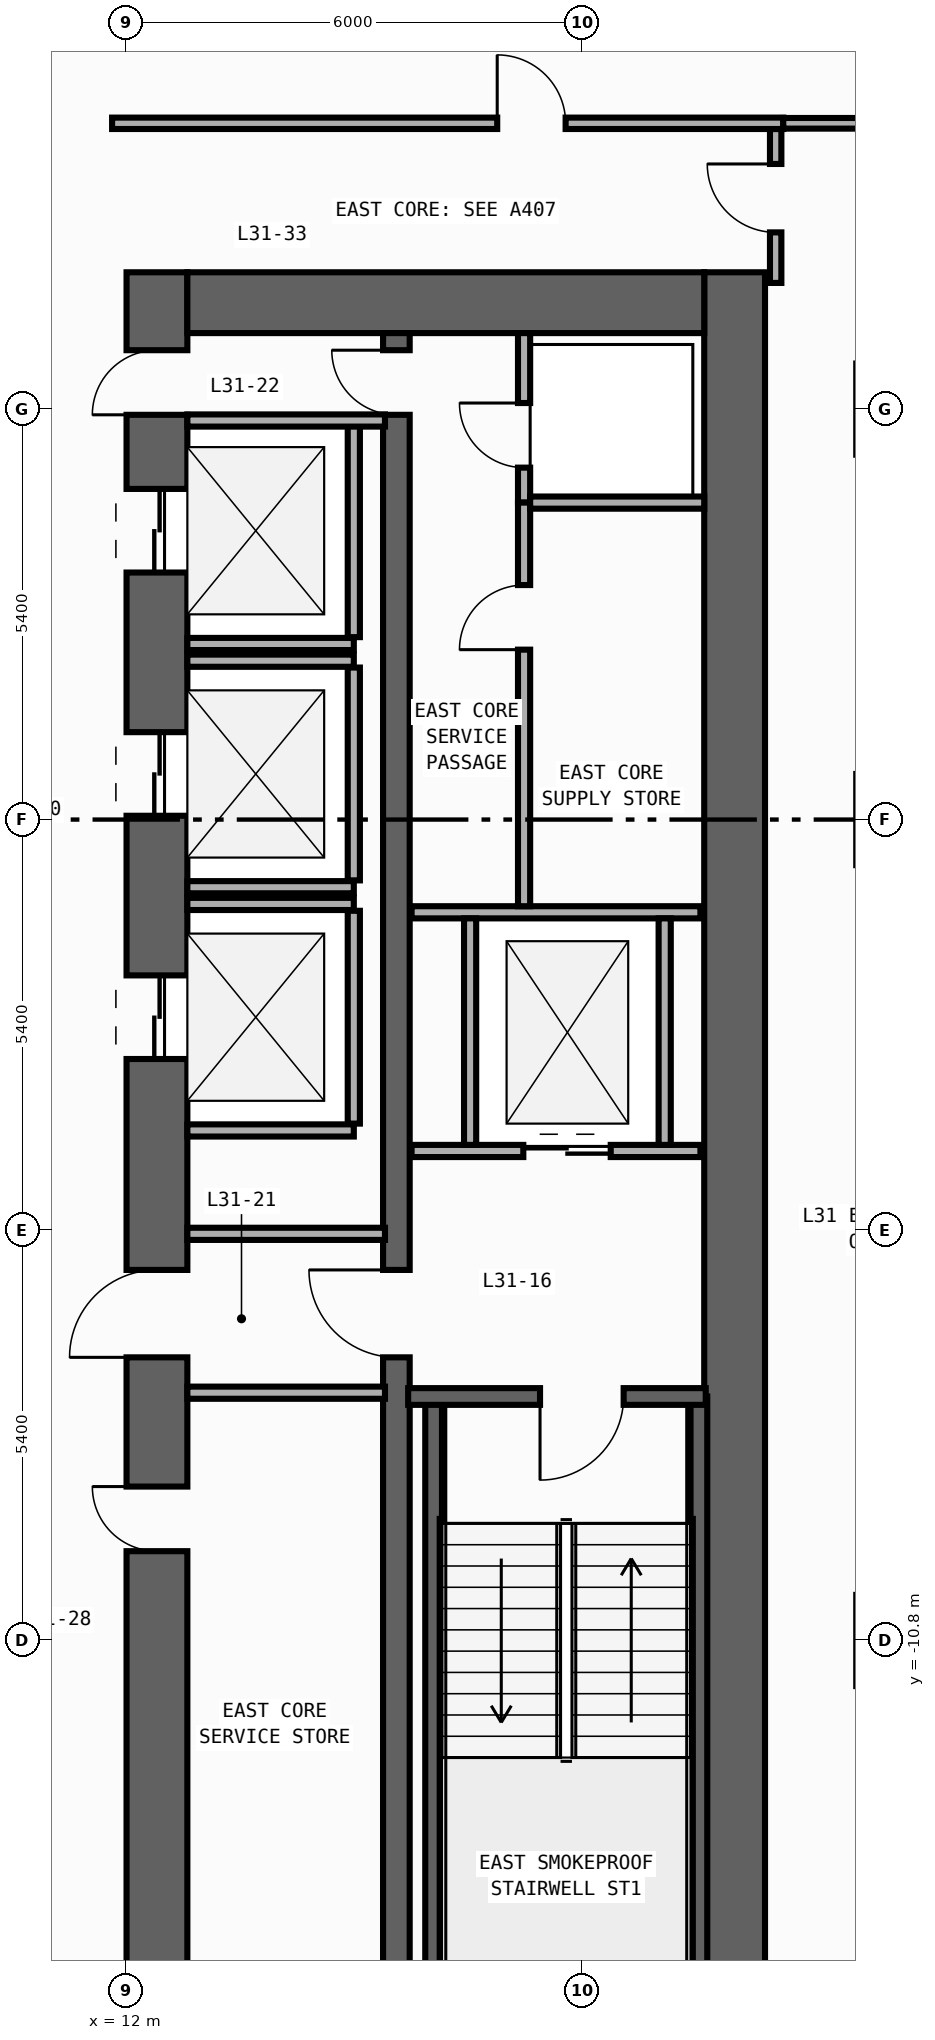
"""IFC4 building model, lengths in metres.
Left out: names, types, materials, properties, quantities, classifications, styles, units other than length and angle.
Written with IfcOpenShell. Run it as: python <this file> out.ifc"""

import sys

from ifc_helpers import new_model, si_unit, direction, frame, frame_2d, origin, origin_2d, place, context, subcontext, project, spatial, rectangle, extrude, element, fill, save


model = new_model("IFC4")
c1 = context("Model", 3, precision=1e-05, world=origin(), true_north=direction((0.0, 1.0)))
c2 = subcontext(c1, "Body", "Model", "MODEL_VIEW")
j1 = project(units=[si_unit("LENGTHUNIT", "METRE"), si_unit("PLANEANGLEUNIT", "RADIAN")], contexts=[c1])
p1 = place(None, origin())
s1 = spatial("IfcSite", under=j1, at=p1, CompositionType="ELEMENT")
p2 = place(p1, origin())
s2 = spatial("IfcBuilding", under=s1, at=p2, CompositionType="ELEMENT")
p3 = place(p2, frame((0.0, 0.0, 135.2)))
s3 = spatial("IfcBuildingStorey", under=s2, at=p3, CompositionType="ELEMENT", Elevation=135.2)
p4 = place(p3, frame((12.4, -19.8, 0.0), z_axis=(0.0, 0.0, 1.0), x_axis=(0.0, 1.0, 0.0)))
e1 = element("IfcWall", 1, at=p4, inside=s3, PredefinedType="SHEAR", context=c2, shape_type="SweptSolid", body=[
    extrude(rectangle(XDim=27.0, YDim=0.8, at=frame_2d((13.5, 0.0))), origin(), (0.0, 0.0, 1.0), 3.94),
])
p5 = place(p4, frame((23.05, 0.0, 0.0)))
e2 = element("IfcOpeningElement", 2, at=p5, cuts=e1, PredefinedType="OPENING", context=c2, shape_type="SweptSolid", body=[
    extrude(rectangle(XDim=1.1, YDim=2.2, at=frame_2d((0.55, 1.1))), frame((0.0, 0.41, 0.0), z_axis=(0.0, -1.0, 0.0), x_axis=(1.0, 0.0, 0.0)), (0.0, 0.0, 1.0), 0.82),
])
p6 = place(p4, frame((19.85, 0.0, 0.0)))
e3 = element("IfcOpeningElement", 3, at=p6, cuts=e1, PredefinedType="OPENING", context=c2, shape_type="SweptSolid", body=[
    extrude(rectangle(XDim=1.1, YDim=2.2, at=frame_2d((0.55, 1.1))), frame((0.0, 0.41, 0.0), z_axis=(0.0, -1.0, 0.0), x_axis=(1.0, 0.0, 0.0)), (0.0, 0.0, 1.0), 0.82),
])
p7 = place(p4, frame((16.65, 0.0, 0.0)))
e4 = element("IfcOpeningElement", 4, at=p7, cuts=e1, PredefinedType="OPENING", context=c2, shape_type="SweptSolid", body=[
    extrude(rectangle(XDim=1.1, YDim=2.2, at=frame_2d((0.55, 1.1))), frame((0.0, 0.41, 0.0), z_axis=(0.0, -1.0, 0.0), x_axis=(1.0, 0.0, 0.0)), (0.0, 0.0, 1.0), 0.82),
])
p8 = place(p4, frame((10.175, 0.0, 0.0)))
e5 = element("IfcOpeningElement", 5, at=p8, cuts=e1, PredefinedType="OPENING", context=c2, shape_type="SweptSolid", body=[
    extrude(rectangle(XDim=0.85, YDim=2.1, at=frame_2d((0.425, 1.05))), frame((0.0, 0.41, 0.0), z_axis=(0.0, -1.0, 0.0), x_axis=(1.0, 0.0, 0.0)), (0.0, 0.0, 1.0), 0.82),
])
p9 = place(p4, frame((12.725, 0.0, 0.0)))
e6 = element("IfcOpeningElement", 6, at=p9, cuts=e1, PredefinedType="OPENING", context=c2, shape_type="SweptSolid", body=[
    extrude(rectangle(XDim=1.15, YDim=2.2, at=frame_2d((0.575, 1.1))), frame((0.0, 0.41, 0.0), z_axis=(0.0, -1.0, 0.0), x_axis=(1.0, 0.0, 0.0)), (0.0, 0.0, 1.0), 0.82),
])
p10 = place(p4, frame((25.125, 0.0, 0.0)))
e7 = element("IfcOpeningElement", 7, at=p10, cuts=e1, PredefinedType="OPENING", context=c2, shape_type="SweptSolid", body=[
    extrude(rectangle(XDim=0.85, YDim=2.1, at=frame_2d((0.425, 1.05))), frame((0.0, 0.41, 0.0), z_axis=(0.0, -1.0, 0.0), x_axis=(1.0, 0.0, 0.0)), (0.0, 0.0, 1.0), 0.82),
])
p11 = place(p3, frame((20.0, -19.8, 0.0), z_axis=(0.0, 0.0, 1.0), x_axis=(0.0, 1.0, 0.0)))
e8 = element("IfcWall", 8, at=p11, inside=s3, PredefinedType="SHEAR", context=c2, shape_type="SweptSolid", body=[
    extrude(rectangle(XDim=27.0, YDim=0.8, at=frame_2d((13.5, 0.0))), origin(), (0.0, 0.0, 1.0), 3.94),
])
p12 = place(p3, frame((12.8, 6.8, 0.0), z_axis=(0.0, 0.0, 1.0), x_axis=(1.0, 0.0, 0.0)))
e9 = element("IfcWall", 9, at=p12, inside=s3, PredefinedType="SHEAR", context=c2, shape_type="SweptSolid", body=[
    extrude(rectangle(XDim=6.8, YDim=0.8, at=frame_2d((3.4, 0.0))), origin(), (0.0, 0.0, 1.0), 3.94),
])
p13 = place(p3, frame((15.55, -19.0, 0.0), z_axis=(0.0, 0.0, 1.0), x_axis=(0.0, 1.0, 0.0)))
e10 = element("IfcWall", 10, at=p13, inside=s3, PredefinedType="SHEAR", context=c2, shape_type="SweptSolid", body=[
    extrude(rectangle(XDim=25.4, YDim=0.35, at=frame_2d((12.7, 0.0))), origin(), (0.0, 0.0, 1.0), 3.94),
])
p14 = place(p13, frame((11.925, 0.0, 0.0)))
e11 = element("IfcOpeningElement", 11, at=p14, cuts=e10, PredefinedType="OPENING", context=c2, shape_type="SweptSolid", body=[
    extrude(rectangle(XDim=1.15, YDim=2.2, at=frame_2d((0.575, 1.1))), frame((0.0, 0.185, 0.0), z_axis=(0.0, -1.0, 0.0), x_axis=(1.0, 0.0, 0.0)), (0.0, 0.0, 1.0), 0.37),
])
p15 = place(p13, frame((24.325, 0.0, 0.0)))
e12 = element("IfcOpeningElement", 12, at=p15, cuts=e10, PredefinedType="OPENING", context=c2, shape_type="SweptSolid", body=[
    extrude(rectangle(XDim=0.85, YDim=2.1, at=frame_2d((0.425, 1.05))), frame((0.0, 0.185, 0.0), z_axis=(0.0, -1.0, 0.0), x_axis=(1.0, 0.0, 0.0)), (0.0, 0.0, 1.0), 0.37),
])
for number, where, z_axis, x_axis in (
    (13, (16.04, -18.89, 0.0), (0.0, 0.0, 1.0), (0.0, 1.0, 0.0)),
    (14, (19.53, -18.89, 0.0), (0.0, 0.0, 1.0), (0.0, 1.0, 0.0)),
):
    element("IfcWall", number, at=place(p3, frame(where, z_axis=z_axis, x_axis=x_axis)), inside=s3, PredefinedType="SHEAR", context=c2, shape_type="SweptSolid", body=[
        extrude(rectangle(XDim=11.3, YDim=0.22, at=frame_2d((5.65, 0.0))), origin(), (0.0, 0.0, 1.0), 3.94),
    ])
p16 = place(p3, frame((19.62, -7.59, 0.0), z_axis=(0.0, 0.0, 1.0), x_axis=(-1.0, 0.0, 0.0)))
e15 = element("IfcWall", 15, at=p16, inside=s3, PredefinedType="SHEAR", context=c2, shape_type="SweptSolid", body=[
    extrude(rectangle(XDim=3.915, YDim=0.22, at=frame_2d((1.958, 0.0))), origin(), (0.0, 0.0, 1.0), 3.94),
])
p17 = place(p16, frame((1.08, 0.0, 0.0)))
e16 = element("IfcOpeningElement", 16, at=p17, cuts=e15, PredefinedType="OPENING", context=c2, shape_type="SweptSolid", body=[
    extrude(rectangle(XDim=1.1, YDim=2.2, at=frame_2d((0.55, 1.1))), frame((0.0, 0.12, 0.0), z_axis=(0.0, -1.0, 0.0), x_axis=(1.0, 0.0, 0.0)), (0.0, 0.0, 1.0), 0.24),
])
for number, where, z_axis, x_axis in (
    (17, (22.2, -10.8, 0.0), (0.0, 0.0, 1.0), (1.0, 0.0, 0.0)),
    (18, (22.2, 0.0, 0.0), (0.0, 0.0, 1.0), (1.0, 0.0, 0.0)),
    (19, (22.2, 5.4, 0.0), (0.0, 0.0, 1.0), (1.0, 0.0, 0.0)),
):
    element("IfcColumn", number, at=place(p3, frame(where, z_axis=z_axis, x_axis=x_axis)), inside=s3, PredefinedType="COLUMN", context=c2, shape_type="SweptSolid", body=[
        extrude(rectangle(XDim=1.2, YDim=1.2, at=origin_2d()), origin(), (0.0, 0.0, 1.0), 4.2),
    ])
p18 = place(p3, frame((12.8, 2.31, 0.0), z_axis=(0.0, 0.0, 1.0), x_axis=(1.0, 0.0, 0.0)))
e20 = element("IfcWall", 20, at=p18, inside=s3, PredefinedType="STANDARD", context=c2, shape_type="SweptSolid", body=[
    extrude(rectangle(XDim=2.19, YDim=0.16, at=frame_2d((1.095, 0.0))), origin(), (0.0, 0.0, 1.0), 3.94),
])
p19 = place(p3, frame((14.99, 2.4, 0.0), z_axis=(0.0, 0.0, 1.0), x_axis=(0.0, 1.0, 0.0)))
e21 = element("IfcWall", 21, at=p19, inside=s3, PredefinedType="STANDARD", context=c2, shape_type="SweptSolid", body=[
    extrude(rectangle(XDim=2.8, YDim=0.16, at=frame_2d((1.4, 0.0))), origin(), (0.0, 0.0, 1.0), 3.94),
])
for number, where, z_axis, x_axis in (
    (22, (12.8, -0.89, 0.0), (0.0, 0.0, 1.0), (1.0, 0.0, 0.0)),
    (23, (12.8, 2.09, 0.0), (0.0, 0.0, 1.0), (1.0, 0.0, 0.0)),
):
    element("IfcWall", number, at=place(p3, frame(where, z_axis=z_axis, x_axis=x_axis)), inside=s3, PredefinedType="STANDARD", context=c2, shape_type="SweptSolid", body=[
        extrude(rectangle(XDim=2.19, YDim=0.16, at=frame_2d((1.095, 0.0))), origin(), (0.0, 0.0, 1.0), 3.94),
    ])
p20 = place(p3, frame((14.99, -0.8, 0.0), z_axis=(0.0, 0.0, 1.0), x_axis=(0.0, 1.0, 0.0)))
e24 = element("IfcWall", 24, at=p20, inside=s3, PredefinedType="STANDARD", context=c2, shape_type="SweptSolid", body=[
    extrude(rectangle(XDim=2.8, YDim=0.16, at=frame_2d((1.4, 0.0))), origin(), (0.0, 0.0, 1.0), 3.94),
])
for number, where, z_axis, x_axis in (
    (25, (12.8, -4.09, 0.0), (0.0, 0.0, 1.0), (1.0, 0.0, 0.0)),
    (26, (12.8, -1.11, 0.0), (0.0, 0.0, 1.0), (1.0, 0.0, 0.0)),
):
    element("IfcWall", number, at=place(p3, frame(where, z_axis=z_axis, x_axis=x_axis)), inside=s3, PredefinedType="STANDARD", context=c2, shape_type="SweptSolid", body=[
        extrude(rectangle(XDim=2.19, YDim=0.16, at=frame_2d((1.095, 0.0))), origin(), (0.0, 0.0, 1.0), 3.94),
    ])
p21 = place(p3, frame((14.99, -4.0, 0.0), z_axis=(0.0, 0.0, 1.0), x_axis=(0.0, 1.0, 0.0)))
e27 = element("IfcWall", 27, at=p21, inside=s3, PredefinedType="STANDARD", context=c2, shape_type="SweptSolid", body=[
    extrude(rectangle(XDim=2.8, YDim=0.16, at=frame_2d((1.4, 0.0))), origin(), (0.0, 0.0, 1.0), 3.94),
])
p22 = place(p3, frame((15.75, -4.36, 0.0), z_axis=(0.0, 0.0, 1.0), x_axis=(1.0, 0.0, 0.0)))
e28 = element("IfcWall", 28, at=p22, inside=s3, PredefinedType="STANDARD", context=c2, shape_type="SweptSolid", body=[
    extrude(rectangle(XDim=3.8, YDim=0.16, at=frame_2d((1.9, 0.0))), origin(), (0.0, 0.0, 1.0), 3.94),
])
p23 = place(p22, frame((1.47, 0.0, 0.0)))
e29 = element("IfcOpeningElement", 29, at=p23, cuts=e28, PredefinedType="OPENING", context=c2, shape_type="SweptSolid", body=[
    extrude(rectangle(XDim=1.15, YDim=2.2, at=frame_2d((0.575, 1.1))), frame((0.0, 0.09, 0.0), z_axis=(0.0, -1.0, 0.0), x_axis=(1.0, 0.0, 0.0)), (0.0, 0.0, 1.0), 0.18),
])
p24 = place(p3, frame((15.75, -1.22, 0.0), z_axis=(0.0, 0.0, 1.0), x_axis=(1.0, 0.0, 0.0)))
e30 = element("IfcWall", 30, at=p24, inside=s3, PredefinedType="STANDARD", context=c2, shape_type="SweptSolid", body=[
    extrude(rectangle(XDim=3.8, YDim=0.16, at=frame_2d((1.9, 0.0))), origin(), (0.0, 0.0, 1.0), 3.94),
])
for number, where, z_axis, x_axis in (
    (31, (16.52, -4.28, 0.0), (0.0, 0.0, 1.0), (0.0, 1.0, 0.0)),
    (32, (19.08, -4.28, 0.0), (0.0, 0.0, 1.0), (0.0, 1.0, 0.0)),
):
    element("IfcWall", number, at=place(p3, frame(where, z_axis=z_axis, x_axis=x_axis)), inside=s3, PredefinedType="STANDARD", context=c2, shape_type="SweptSolid", body=[
        extrude(rectangle(XDim=2.98, YDim=0.16, at=frame_2d((1.49, 0.0))), origin(), (0.0, 0.0, 1.0), 3.94),
    ])
for number, where, z_axis, x_axis in (
    (33, (12.8, -5.45, 0.0), (0.0, 0.0, 1.0), (1.0, 0.0, 0.0)),
    (34, (12.8, -7.54, 0.0), (0.0, 0.0, 1.0), (1.0, 0.0, 0.0)),
    (35, (12.8, 5.25, 0.0), (0.0, 0.0, 1.0), (1.0, 0.0, 0.0)),
):
    element("IfcWall", number, at=place(p3, frame(where, z_axis=z_axis, x_axis=x_axis)), inside=s3, PredefinedType="STANDARD", context=c2, shape_type="SweptSolid", body=[
        extrude(rectangle(XDim=2.6, YDim=0.16, at=frame_2d((1.3, 0.0))), origin(), (0.0, 0.0, 1.0), 3.94),
    ])
p25 = place(p3, frame((17.23, 4.17, 0.0), z_axis=(0.0, 0.0, 1.0), x_axis=(0.0, 1.0, 0.0)))
e36 = element("IfcWall", 36, at=p25, inside=s3, PredefinedType="PARTITIONING", context=c2, shape_type="SweptSolid", body=[
    extrude(rectangle(XDim=2.23, YDim=0.16, at=frame_2d((1.115, 0.0))), origin(), (0.0, 0.0, 1.0), 3.94),
])
p26 = place(p25, frame((0.46, 0.0, 0.0)))
e37 = element("IfcOpeningElement", 37, at=p26, cuts=e36, PredefinedType="OPENING", context=c2, shape_type="SweptSolid", body=[
    extrude(rectangle(XDim=0.85, YDim=2.1, at=frame_2d((0.425, 1.05))), frame((0.0, 0.09, 0.0), z_axis=(0.0, -1.0, 0.0), x_axis=(1.0, 0.0, 0.0)), (0.0, 0.0, 1.0), 0.18),
])
p27 = place(p3, frame((17.23, -1.14, 0.0), z_axis=(0.0, 0.0, 1.0), x_axis=(0.0, 1.0, 0.0)))
e38 = element("IfcWall", 38, at=p27, inside=s3, PredefinedType="PARTITIONING", context=c2, shape_type="SweptSolid", body=[
    extrude(rectangle(XDim=5.31, YDim=0.16, at=frame_2d((2.655, 0.0))), origin(), (0.0, 0.0, 1.0), 3.94),
])
p28 = place(p27, frame((3.375, 0.0, 0.0)))
e39 = element("IfcOpeningElement", 39, at=p28, cuts=e38, PredefinedType="OPENING", context=c2, shape_type="SweptSolid", body=[
    extrude(rectangle(XDim=0.85, YDim=2.1, at=frame_2d((0.425, 1.05))), frame((0.0, 0.09, 0.0), z_axis=(0.0, -1.0, 0.0), x_axis=(1.0, 0.0, 0.0)), (0.0, 0.0, 1.0), 0.18),
])
p29 = place(p3, frame((17.31, 4.17, 0.0), z_axis=(0.0, 0.0, 1.0), x_axis=(1.0, 0.0, 0.0)))
e40 = element("IfcWall", 40, at=p29, inside=s3, PredefinedType="PARTITIONING", context=c2, shape_type="SweptSolid", body=[
    extrude(rectangle(XDim=2.29, YDim=0.16, at=frame_2d((1.145, 0.0))), origin(), (0.0, 0.0, 1.0), 3.94),
])
p30 = place(p3, frame((20.54, 7.06, 0.0), z_axis=(0.0, 0.0, 1.0), x_axis=(0.0, 1.0, 0.0)))
e41 = element("IfcWall", 41, at=p30, inside=s3, PredefinedType="PARTITIONING", context=c2, shape_type="SweptSolid", body=[
    extrude(rectangle(XDim=2.025, YDim=0.15, at=frame_2d((1.012, 0.0))), origin(), (0.0, 0.0, 1.0), 3.94),
])
p31 = place(p30, frame((0.665, 0.0, 0.0)))
e42 = element("IfcOpeningElement", 42, at=p31, cuts=e41, PredefinedType="OPENING", context=c2, shape_type="SweptSolid", body=[
    extrude(rectangle(XDim=0.9, YDim=2.15, at=frame_2d((0.45, 1.075))), frame((0.0, 0.085, 0.0), z_axis=(0.0, -1.0, 0.0), x_axis=(1.0, 0.0, 0.0)), (0.0, 0.0, 1.0), 0.17),
])
p32 = place(p3, frame((11.81, 9.16, 0.0), z_axis=(0.0, 0.0, 1.0), x_axis=(1.0, 0.0, 0.0)))
e43 = element("IfcWall", 43, at=p32, inside=s3, PredefinedType="PARTITIONING", context=c2, shape_type="SweptSolid", body=[
    extrude(rectangle(XDim=8.83, YDim=0.15, at=frame_2d((4.415, 0.0))), origin(), (0.0, 0.0, 1.0), 3.94),
])
p33 = place(p32, frame((5.067, 0.0, 0.0)))
e44 = element("IfcOpeningElement", 44, at=p33, cuts=e43, PredefinedType="OPENING", context=c2, shape_type="SweptSolid", body=[
    extrude(rectangle(XDim=0.9, YDim=2.15, at=frame_2d((0.45, 1.075))), frame((0.0, 0.085, 0.0), z_axis=(0.0, -1.0, 0.0), x_axis=(1.0, 0.0, 0.0)), (0.0, 0.0, 1.0), 0.17),
])
p34 = place(p3, frame((20.64, 9.16, 0.0), z_axis=(0.0, 0.0, 1.0), x_axis=(1.0, 0.0, 0.0)))
e45 = element("IfcWall", 45, at=p34, inside=s3, PredefinedType="PARTITIONING", context=c2, shape_type="SweptSolid", body=[
    extrude(rectangle(XDim=2.815, YDim=0.14, at=frame_2d((1.408, 0.0))), origin(), (0.0, 0.0, 1.0), 3.94),
])
p35 = place(p17, origin())
e46 = element("IfcDoor", 46, at=p35, inside=s3, OperationType="SINGLE_SWING_RIGHT", PredefinedType="DOOR", context=c2, shape_type="SweptSolid", body=[
    extrude(rectangle(XDim=1.1, YDim=2.2, at=frame_2d((0.55, 1.1))), frame((0.0, 0.025, 0.0), z_axis=(0.0, -1.0, 0.0), x_axis=(1.0, 0.0, 0.0)), (0.0, 0.0, 1.0), 0.05),
])
fill(e16, e46)
p36 = place(p5, origin())
e47 = element("IfcDoor", 47, at=p36, inside=s3, OperationType="DOUBLE_DOOR_SLIDING", PredefinedType="DOOR", context=c2, shape_type="SweptSolid", body=[
    extrude(rectangle(XDim=1.1, YDim=2.2, at=frame_2d((0.55, 1.1))), frame((0.0, 0.025, 0.0), z_axis=(0.0, -1.0, 0.0), x_axis=(1.0, 0.0, 0.0)), (0.0, 0.0, 1.0), 0.05),
])
fill(e2, e47)
p37 = place(p6, origin())
e48 = element("IfcDoor", 48, at=p37, inside=s3, OperationType="DOUBLE_DOOR_SLIDING", PredefinedType="DOOR", context=c2, shape_type="SweptSolid", body=[
    extrude(rectangle(XDim=1.1, YDim=2.2, at=frame_2d((0.55, 1.1))), frame((0.0, 0.025, 0.0), z_axis=(0.0, -1.0, 0.0), x_axis=(1.0, 0.0, 0.0)), (0.0, 0.0, 1.0), 0.05),
])
fill(e3, e48)
p38 = place(p7, origin())
e49 = element("IfcDoor", 49, at=p38, inside=s3, OperationType="DOUBLE_DOOR_SLIDING", PredefinedType="DOOR", context=c2, shape_type="SweptSolid", body=[
    extrude(rectangle(XDim=1.1, YDim=2.2, at=frame_2d((0.55, 1.1))), frame((0.0, 0.025, 0.0), z_axis=(0.0, -1.0, 0.0), x_axis=(1.0, 0.0, 0.0)), (0.0, 0.0, 1.0), 0.05),
])
fill(e4, e49)
p39 = place(p8, origin())
e50 = element("IfcDoor", 50, at=p39, inside=s3, OperationType="SINGLE_SWING_RIGHT", PredefinedType="DOOR", context=c2, shape_type="SweptSolid", body=[
    extrude(rectangle(XDim=0.85, YDim=2.1, at=frame_2d((0.425, 1.05))), frame((0.0, 0.025, 0.0), z_axis=(0.0, -1.0, 0.0), x_axis=(1.0, 0.0, 0.0)), (0.0, 0.0, 1.0), 0.05),
])
fill(e5, e50)
p40 = place(p9, origin())
e51 = element("IfcDoor", 51, at=p40, inside=s3, OperationType="SINGLE_SWING_LEFT", PredefinedType="DOOR", context=c2, shape_type="SweptSolid", body=[
    extrude(rectangle(XDim=1.15, YDim=2.2, at=frame_2d((0.575, 1.1))), frame((0.0, 0.025, 0.0), z_axis=(0.0, -1.0, 0.0), x_axis=(1.0, 0.0, 0.0)), (0.0, 0.0, 1.0), 0.05),
])
fill(e6, e51)
p41 = place(p14, origin())
e52 = element("IfcDoor", 52, at=p41, inside=s3, OperationType="SINGLE_SWING_RIGHT", PredefinedType="DOOR", context=c2, shape_type="SweptSolid", body=[
    extrude(rectangle(XDim=1.15, YDim=2.2, at=frame_2d((0.575, 1.1))), frame((0.0, 0.025, 0.0), z_axis=(0.0, -1.0, 0.0), x_axis=(1.0, 0.0, 0.0)), (0.0, 0.0, 1.0), 0.05),
])
fill(e11, e52)
p42 = place(p10, origin())
e53 = element("IfcDoor", 53, at=p42, inside=s3, OperationType="SINGLE_SWING_LEFT", PredefinedType="DOOR", context=c2, shape_type="SweptSolid", body=[
    extrude(rectangle(XDim=0.85, YDim=2.1, at=frame_2d((0.425, 1.05))), frame((0.0, 0.025, 0.0), z_axis=(0.0, -1.0, 0.0), x_axis=(1.0, 0.0, 0.0)), (0.0, 0.0, 1.0), 0.05),
])
fill(e7, e53)
p43 = place(p15, origin())
e54 = element("IfcDoor", 54, at=p43, inside=s3, OperationType="SINGLE_SWING_RIGHT", PredefinedType="DOOR", context=c2, shape_type="SweptSolid", body=[
    extrude(rectangle(XDim=0.85, YDim=2.1, at=frame_2d((0.425, 1.05))), frame((0.0, 0.025, 0.0), z_axis=(0.0, -1.0, 0.0), x_axis=(1.0, 0.0, 0.0)), (0.0, 0.0, 1.0), 0.05),
])
fill(e12, e54)
p44 = place(p23, origin())
e55 = element("IfcDoor", 55, at=p44, inside=s3, OperationType="DOUBLE_DOOR_SLIDING", PredefinedType="DOOR", context=c2, shape_type="SweptSolid", body=[
    extrude(rectangle(XDim=1.15, YDim=2.2, at=frame_2d((0.575, 1.1))), frame((0.0, 0.025, 0.0), z_axis=(0.0, -1.0, 0.0), x_axis=(1.0, 0.0, 0.0)), (0.0, 0.0, 1.0), 0.05),
])
fill(e29, e55)
p45 = place(p26, origin())
e56 = element("IfcDoor", 56, at=p45, inside=s3, OperationType="SINGLE_SWING_RIGHT", PredefinedType="DOOR", context=c2, shape_type="SweptSolid", body=[
    extrude(rectangle(XDim=0.85, YDim=2.1, at=frame_2d((0.425, 1.05))), frame((0.0, 0.025, 0.0), z_axis=(0.0, -1.0, 0.0), x_axis=(1.0, 0.0, 0.0)), (0.0, 0.0, 1.0), 0.05),
])
fill(e37, e56)
p46 = place(p28, origin())
e57 = element("IfcDoor", 57, at=p46, inside=s3, OperationType="SINGLE_SWING_LEFT", PredefinedType="DOOR", context=c2, shape_type="SweptSolid", body=[
    extrude(rectangle(XDim=0.85, YDim=2.1, at=frame_2d((0.425, 1.05))), frame((0.0, 0.025, 0.0), z_axis=(0.0, -1.0, 0.0), x_axis=(1.0, 0.0, 0.0)), (0.0, 0.0, 1.0), 0.05),
])
fill(e39, e57)
p47 = place(p31, origin())
e58 = element("IfcDoor", 58, at=p47, inside=s3, OperationType="SINGLE_SWING_RIGHT", PredefinedType="DOOR", context=c2, shape_type="SweptSolid", body=[
    extrude(rectangle(XDim=0.9, YDim=2.15, at=frame_2d((0.45, 1.075))), frame((0.0, 0.025, 0.0), z_axis=(0.0, -1.0, 0.0), x_axis=(1.0, 0.0, 0.0)), (0.0, 0.0, 1.0), 0.05),
])
fill(e42, e58)
p48 = place(p33, origin())
e59 = element("IfcDoor", 59, at=p48, inside=s3, OperationType="SINGLE_SWING_LEFT", PredefinedType="DOOR", context=c2, shape_type="SweptSolid", body=[
    extrude(rectangle(XDim=0.9, YDim=2.15, at=frame_2d((0.45, 1.075))), frame((0.0, 0.025, 0.0), z_axis=(0.0, -1.0, 0.0), x_axis=(1.0, 0.0, 0.0)), (0.0, 0.0, 1.0), 0.05),
])
fill(e44, e59)
save(model, sys.argv[1])
